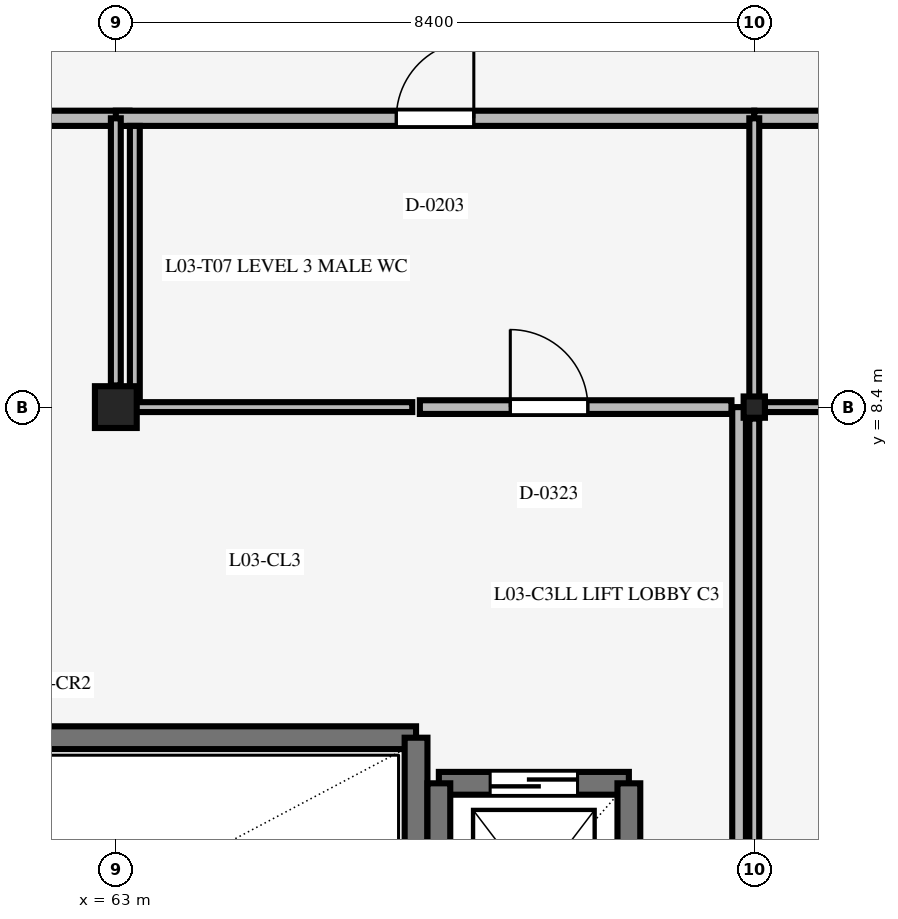
"""IFC4 building model, lengths in metres.
Left out: names, types, materials, properties, quantities, classifications, styles, units other than length and angle.
Written with IfcOpenShell. Run it as: python <this file> out.ifc"""

import sys

from ifc_helpers import new_model, si_unit, direction, frame, frame_2d, origin, origin_2d, place, context, subcontext, project, spatial, rectangle, i_section, extrude, element, fill, save


model = new_model("IFC4")
c1 = context("Model", 3, precision=1e-05, world=origin(), true_north=direction((0.0, 1.0)))
c2 = subcontext(c1, "Body", "Model", "MODEL_VIEW")
j1 = project(units=[si_unit("LENGTHUNIT", "METRE"), si_unit("PLANEANGLEUNIT", "RADIAN")], contexts=[c1])
p1 = place(None, origin())
s1 = spatial("IfcSite", under=j1, at=p1, CompositionType="ELEMENT")
p2 = place(p1, origin())
s2 = spatial("IfcBuilding", under=s1, at=p2, CompositionType="ELEMENT")
p3 = place(p2, frame((0.0, 0.0, 15.9)))
s3 = spatial("IfcBuildingStorey", under=s2, at=p3, CompositionType="ELEMENT", Elevation=15.9)
p4 = place(p3, frame((63.0, 8.4, 0.0), z_axis=(0.0, 0.0, 1.0), x_axis=(1.0, 0.0, 0.0)))
e1 = element("IfcColumn", 1, at=p4, inside=s3, PredefinedType="COLUMN", context=c2, shape_type="SweptSolid", body=[
    extrude(rectangle(XDim=0.55, YDim=0.55, at=origin_2d()), origin(), (0.0, 0.0, 1.0), 3.9),
])
p5 = place(p3, frame((71.4, 8.4, 0.0), z_axis=(0.0, 0.0, 1.0), x_axis=(1.0, 0.0, 0.0)))
e2 = element("IfcColumn", 2, at=p5, inside=s3, PredefinedType="COLUMN", context=c2, shape_type="SweptSolid", body=[
    extrude(i_section(OverallWidth=0.28, OverallDepth=0.28, WebThickness=0.01, FlangeThickness=0.018, FilletRadius=0.024, at=origin_2d()), origin(), (0.0, 0.0, 1.0), 3.9),
])
p6 = place(p3, frame((57.45, 4.05, 0.0), z_axis=(0.0, 0.0, 1.0), x_axis=(1.0, 0.0, 0.0)))
e3 = element("IfcWall", 3, at=p6, inside=s3, PredefinedType="SHEAR", context=c2, shape_type="SweptSolid", body=[
    extrude(rectangle(XDim=9.5, YDim=0.3, at=frame_2d((4.75, 0.0))), origin(), (0.0, 0.0, 1.0), 3.3),
])
p7 = place(p3, frame((66.95, 0.25, 0.0), z_axis=(0.0, 0.0, 1.0), x_axis=(0.0, 1.0, 0.0)))
e4 = element("IfcWall", 4, at=p7, inside=s3, PredefinedType="SHEAR", context=c2, shape_type="SweptSolid", body=[
    extrude(rectangle(XDim=3.8, YDim=0.3, at=frame_2d((1.9, 0.0))), origin(), (0.0, 0.0, 1.0), 3.3),
])
p8 = place(p3, frame((67.25, 3.45, 0.0), z_axis=(0.0, 0.0, 1.0), x_axis=(1.0, 0.0, 0.0)))
e5 = element("IfcWall", 5, at=p8, inside=s3, PredefinedType="SHEAR", context=c2, shape_type="SweptSolid", body=[
    extrude(rectangle(XDim=2.5, YDim=0.3, at=frame_2d((1.25, 0.0))), origin(), (0.0, 0.0, 1.0), 3.4),
])
p9 = place(p8, frame((0.675, 0.0, 0.0)))
e6 = element("IfcOpeningElement", 6, at=p9, cuts=e5, PredefinedType="OPENING", context=c2, shape_type="SweptSolid", body=[
    extrude(rectangle(XDim=1.15, YDim=2.2, at=frame_2d((0.575, 1.1))), frame((0.0, 0.16, 0.0), z_axis=(0.0, -1.0, 0.0), x_axis=(1.0, 0.0, 0.0)), (0.0, 0.0, 1.0), 0.32),
])
for number, where, z_axis, x_axis in (
    (7, (67.25, 0.65, 0.0), (0.0, 0.0, 1.0), (0.0, 1.0, 0.0)),
    (8, (69.75, 0.65, 0.0), (0.0, 0.0, 1.0), (0.0, 1.0, 0.0)),
):
    element("IfcWall", number, at=place(p3, frame(where, z_axis=z_axis, x_axis=x_axis)), inside=s3, PredefinedType="SHEAR", context=c2, shape_type="SweptSolid", body=[
        extrude(rectangle(XDim=2.8, YDim=0.3, at=frame_2d((1.4, 0.0))), origin(), (0.0, 0.0, 1.0), 3.4),
    ])
p10 = place(p3, frame((54.6, 12.2, 0.0), z_axis=(0.0, 0.0, 1.0), x_axis=(1.0, 0.0, 0.0)))
e9 = element("IfcWall", 9, at=p10, inside=s3, PredefinedType="STANDARD", context=c2, shape_type="SweptSolid", body=[
    extrude(rectangle(XDim=8.58, YDim=0.2, at=frame_2d((4.29, 0.0))), origin(), (0.0, 0.0, 1.0), 2.9),
])
p11 = place(p10, frame((3.69, 0.0, 0.0)))
e10 = element("IfcOpeningElement", 10, at=p11, cuts=e9, PredefinedType="OPENING", context=c2, shape_type="SweptSolid", body=[
    extrude(rectangle(XDim=1.02, YDim=2.15, at=frame_2d((0.51, 1.075))), frame((0.0, 0.11, 0.0), z_axis=(0.0, -1.0, 0.0), x_axis=(1.0, 0.0, 0.0)), (0.0, 0.0, 1.0), 0.22),
])
p12 = place(p3, frame((63.0, 12.2, 0.0), z_axis=(0.0, 0.0, 1.0), x_axis=(1.0, 0.0, 0.0)))
e11 = element("IfcWall", 11, at=p12, inside=s3, PredefinedType="STANDARD", context=c2, shape_type="SweptSolid", body=[
    extrude(rectangle(XDim=8.4, YDim=0.2, at=frame_2d((4.2, 0.0))), origin(), (0.0, 0.0, 1.0), 2.9),
])
p13 = place(p12, frame((3.69, 0.0, 0.0)))
e12 = element("IfcOpeningElement", 12, at=p13, cuts=e11, PredefinedType="OPENING", context=c2, shape_type="SweptSolid", body=[
    extrude(rectangle(XDim=1.02, YDim=2.15, at=frame_2d((0.51, 1.075))), frame((0.0, 0.11, 0.0), z_axis=(0.0, -1.0, 0.0), x_axis=(1.0, 0.0, 0.0)), (0.0, 0.0, 1.0), 0.22),
])
p14 = place(p3, frame((71.4, 12.2, 0.0), z_axis=(0.0, 0.0, 1.0), x_axis=(1.0, 0.0, 0.0)))
e13 = element("IfcWall", 13, at=p14, inside=s3, PredefinedType="STANDARD", context=c2, shape_type="SweptSolid", body=[
    extrude(rectangle(XDim=4.3, YDim=0.2, at=frame_2d((2.15, 0.0))), origin(), (0.0, 0.0, 1.0), 2.9),
])
p15 = place(p14, frame((1.71, 0.0, 0.0)))
e14 = element("IfcOpeningElement", 14, at=p15, cuts=e13, PredefinedType="OPENING", context=c2, shape_type="SweptSolid", body=[
    extrude(rectangle(XDim=0.88, YDim=2.1, at=frame_2d((0.44, 1.05))), frame((0.0, 0.11, 0.0), z_axis=(0.0, -1.0, 0.0), x_axis=(1.0, 0.0, 0.0)), (0.0, 0.0, 1.0), 0.22),
])
p16 = place(p3, frame((63.0, 8.685, 0.0), z_axis=(0.0, 0.0, 1.0), x_axis=(0.0, 1.0, 0.0)))
e15 = element("IfcWall", 15, at=p16, inside=s3, PredefinedType="STANDARD", context=c2, shape_type="SweptSolid", body=[
    extrude(rectangle(XDim=3.515, YDim=0.13, at=frame_2d((1.757, 0.0))), origin(), (0.0, 0.0, 1.0), 2.9),
])
p17 = place(p3, frame((71.4, 0.14, 0.0), z_axis=(0.0, 0.0, 1.0), x_axis=(0.0, 1.0, 0.0)))
e16 = element("IfcWall", 16, at=p17, inside=s3, PredefinedType="STANDARD", context=c2, shape_type="SweptSolid", body=[
    extrude(rectangle(XDim=8.11, YDim=0.13, at=frame_2d((4.055, 0.0))), origin(), (0.0, 0.0, 1.0), 2.9),
])
p18 = place(p3, frame((71.4, 8.255, 0.0), z_axis=(0.0, 0.0, 1.0), x_axis=(0.0, 1.0, 0.0)))
e17 = element("IfcWall", 17, at=p18, inside=s3, PredefinedType="STANDARD", context=c2, shape_type="SweptSolid", body=[
    extrude(rectangle(XDim=3.945, YDim=0.13, at=frame_2d((1.973, 0.0))), origin(), (0.0, 0.0, 1.0), 2.9),
])
p19 = place(p3, frame((63.25, 8.4, 0.0), z_axis=(0.0, 0.0, 1.0), x_axis=(0.0, 1.0, 0.0)))
e18 = element("IfcWall", 18, at=p19, inside=s3, PredefinedType="STANDARD", context=c2, shape_type="SweptSolid", body=[
    extrude(rectangle(XDim=3.7, YDim=0.13, at=frame_2d((1.85, 0.0))), origin(), (0.0, 0.0, 1.0), 2.9),
])
p20 = place(p3, frame((63.25, 8.4, 0.0), z_axis=(0.0, 0.0, 1.0), x_axis=(1.0, 0.0, 0.0)))
e19 = element("IfcWall", 19, at=p20, inside=s3, PredefinedType="STANDARD", context=c2, shape_type="SweptSolid", body=[
    extrude(rectangle(XDim=3.65, YDim=0.13, at=frame_2d((1.825, 0.0))), origin(), (0.0, 0.0, 1.0), 2.9),
])
p21 = place(p3, frame((71.47, 8.4, 0.0), z_axis=(0.0, 0.0, 1.0), x_axis=(1.0, 0.0, 0.0)))
e20 = element("IfcWall", 20, at=p21, inside=s3, PredefinedType="STANDARD", context=c2, shape_type="SweptSolid", body=[
    extrude(rectangle(XDim=8.19, YDim=0.13, at=frame_2d((4.095, 0.0))), origin(), (0.0, 0.0, 1.0), 2.9),
])
p22 = place(p3, frame((67.0, 8.4, 0.0), z_axis=(0.0, 0.0, 1.0), x_axis=(1.0, 0.0, 0.0)))
e21 = element("IfcWall", 21, at=p22, inside=s3, PredefinedType="STANDARD", context=c2, shape_type="SweptSolid", body=[
    extrude(rectangle(XDim=4.1, YDim=0.18, at=frame_2d((2.05, 0.0))), origin(), (0.0, 0.0, 1.0), 2.9),
])
p23 = place(p22, frame((1.19, 0.0, 0.0)))
e22 = element("IfcOpeningElement", 22, at=p23, cuts=e21, PredefinedType="OPENING", context=c2, shape_type="SweptSolid", body=[
    extrude(rectangle(XDim=1.02, YDim=2.15, at=frame_2d((0.51, 1.075))), frame((0.0, 0.1, 0.0), z_axis=(0.0, -1.0, 0.0), x_axis=(1.0, 0.0, 0.0)), (0.0, 0.0, 1.0), 0.2),
])
p24 = place(p3, frame((71.2, 0.3, 0.0), z_axis=(0.0, 0.0, 1.0), x_axis=(0.0, 1.0, 0.0)))
e23 = element("IfcWall", 23, at=p24, inside=s3, PredefinedType="STANDARD", context=c2, shape_type="SweptSolid", body=[
    extrude(rectangle(XDim=8.1, YDim=0.18, at=frame_2d((4.05, 0.0))), origin(), (0.0, 0.0, 1.0), 2.9),
])
p25 = place(p9, origin())
e24 = element("IfcDoor", 24, at=p25, inside=s3, OperationType="DOUBLE_DOOR_SLIDING", PredefinedType="DOOR", context=c2, shape_type="SweptSolid", body=[
    extrude(rectangle(XDim=1.15, YDim=2.2, at=frame_2d((0.575, 1.1))), frame((0.0, 0.025, 0.0), z_axis=(0.0, -1.0, 0.0), x_axis=(1.0, 0.0, 0.0)), (0.0, 0.0, 1.0), 0.05),
])
fill(e6, e24)
p26 = place(p13, origin())
e25 = element("IfcDoor", 25, at=p26, inside=s3, OperationType="SINGLE_SWING_RIGHT", PredefinedType="DOOR", context=c2, shape_type="SweptSolid", body=[
    extrude(rectangle(XDim=1.02, YDim=2.15, at=frame_2d((0.51, 1.075))), frame((0.0, 0.025, 0.0), z_axis=(0.0, -1.0, 0.0), x_axis=(1.0, 0.0, 0.0)), (0.0, 0.0, 1.0), 0.05),
])
fill(e12, e25)
p27 = place(p23, origin())
e26 = element("IfcDoor", 26, at=p27, inside=s3, OperationType="SINGLE_SWING_LEFT", PredefinedType="DOOR", context=c2, shape_type="SweptSolid", body=[
    extrude(rectangle(XDim=1.02, YDim=2.15, at=frame_2d((0.51, 1.075))), frame((0.0, 0.025, 0.0), z_axis=(0.0, -1.0, 0.0), x_axis=(1.0, 0.0, 0.0)), (0.0, 0.0, 1.0), 0.05),
])
fill(e22, e26)
save(model, sys.argv[1])
